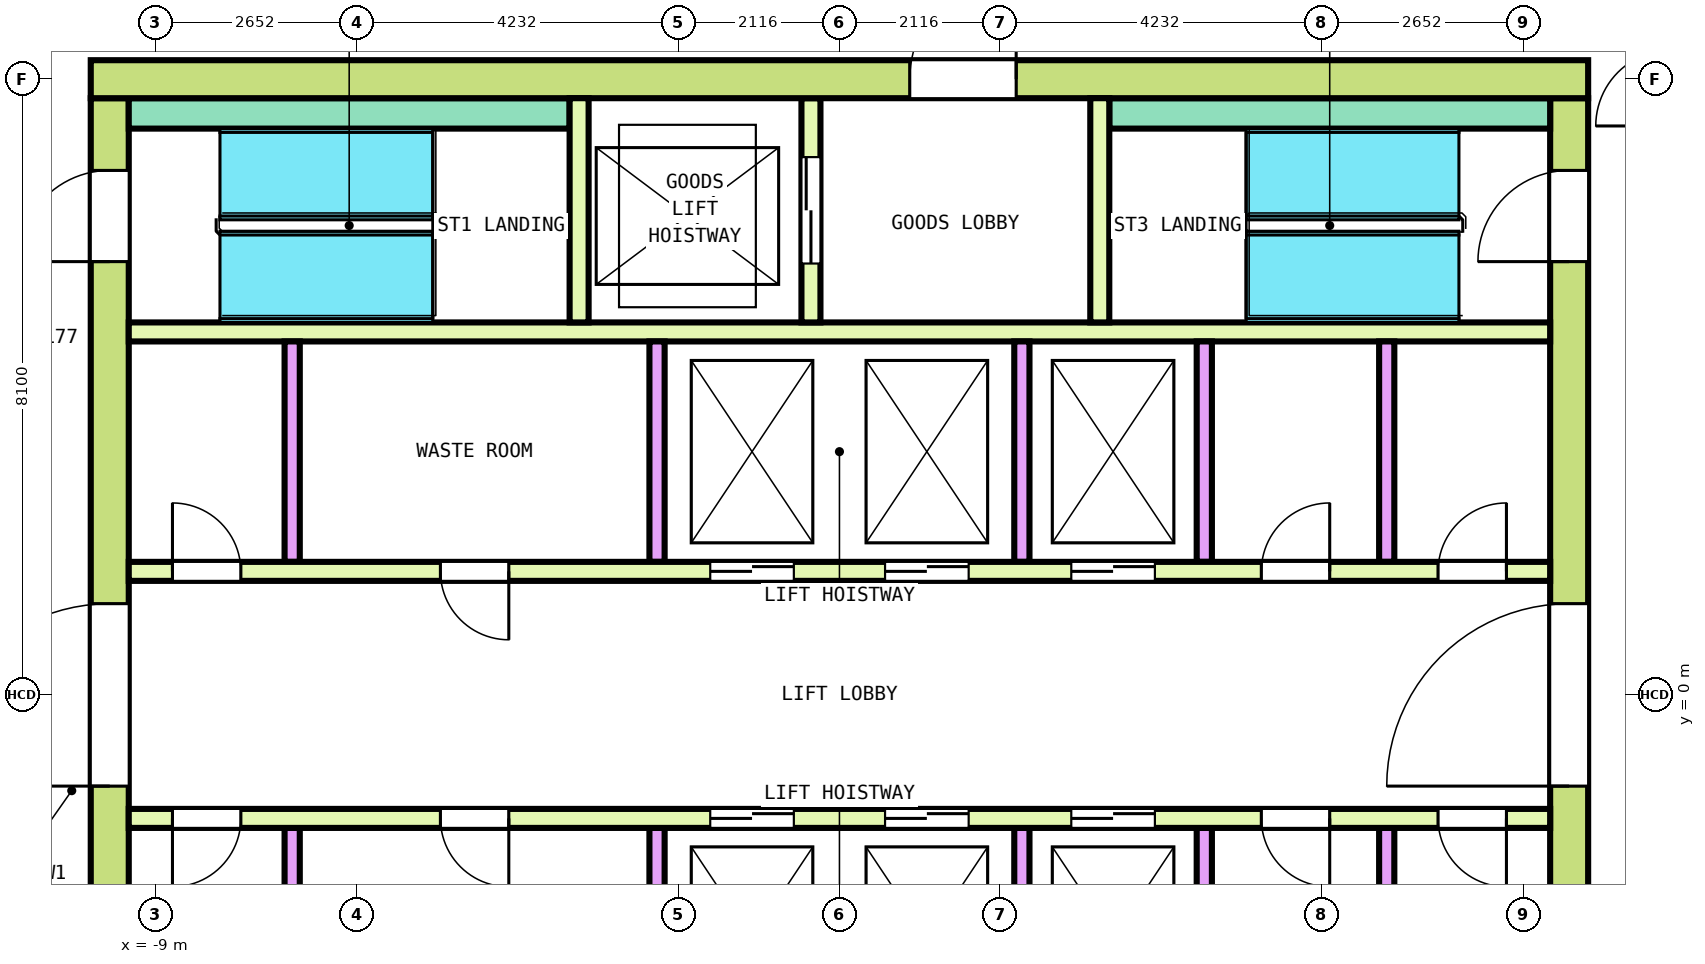
"""IFC4 building model, lengths in metres.
Left out: names, types, materials, properties, quantities, classifications, styles, units other than length and angle.
Written with IfcOpenShell. Run it as: python <this file> out.ifc"""

import sys

from ifc_helpers import new_model, si_unit, direction, frame, frame_2d, origin, place, context, subcontext, project, spatial, rectangle, extrude, element, fill, save


model = new_model("IFC4")
c1 = context("Model", 3, precision=1e-05, world=origin(), true_north=direction((0.0, 1.0)))
c2 = subcontext(c1, "Body", "Model", "MODEL_VIEW")
j1 = project(units=[si_unit("LENGTHUNIT", "METRE"), si_unit("PLANEANGLEUNIT", "RADIAN")], contexts=[c1])
p1 = place(None, origin())
s1 = spatial("IfcSite", under=j1, at=p1, CompositionType="ELEMENT")
p2 = place(p1, origin())
s2 = spatial("IfcBuilding", under=s1, at=p2, CompositionType="ELEMENT")
p3 = place(p2, frame((0.0, 0.0, 279.0)))
s3 = spatial("IfcBuildingStorey", under=s2, at=p3, CompositionType="ELEMENT", Elevation=279.0)
p4 = place(p3, frame((-9.85, 8.1, 0.0), z_axis=(0.0, 0.0, 1.0), x_axis=(1.0, 0.0, 0.0)))
e1 = element("IfcWall", 1, at=p4, inside=s3, PredefinedType="SHEAR", context=c2, shape_type="SweptSolid", body=[
    extrude(rectangle(XDim=19.7, YDim=0.5, at=frame_2d((9.85, 0.0))), origin(), (0.0, 0.0, 1.0), 3.7),
])
p5 = place(p4, frame((10.775, 0.0, 0.0)))
e2 = element("IfcOpeningElement", 2, at=p5, cuts=e1, PredefinedType="OPENING", context=c2, shape_type="SweptSolid", body=[
    extrude(rectangle(XDim=1.4, YDim=2.1, at=frame_2d((0.7, 1.05))), frame((0.0, 0.26, 0.0), z_axis=(0.0, -1.0, 0.0), x_axis=(1.0, 0.0, 0.0)), (0.0, 0.0, 1.0), 0.52),
])
p6 = place(p3, frame((-9.6, -7.85, 0.0), z_axis=(0.0, 0.0, 1.0), x_axis=(0.0, 1.0, 0.0)))
e3 = element("IfcWall", 3, at=p6, inside=s3, PredefinedType="SHEAR", context=c2, shape_type="SweptSolid", body=[
    extrude(rectangle(XDim=15.7, YDim=0.5, at=frame_2d((7.85, 0.0))), origin(), (0.0, 0.0, 1.0), 3.7),
])
p7 = place(p6, frame((6.65, 0.0, 0.0)))
e4 = element("IfcOpeningElement", 4, at=p7, cuts=e3, PredefinedType="OPENING", context=c2, shape_type="SweptSolid", body=[
    extrude(rectangle(XDim=2.4, YDim=2.1, at=frame_2d((1.2, 1.05))), frame((0.0, 0.26, 0.0), z_axis=(0.0, -1.0, 0.0), x_axis=(1.0, 0.0, 0.0)), (0.0, 0.0, 1.0), 0.52),
])
p8 = place(p6, frame((13.55, 0.0, 0.0)))
e5 = element("IfcOpeningElement", 5, at=p8, cuts=e3, PredefinedType="OPENING", context=c2, shape_type="SweptSolid", body=[
    extrude(rectangle(XDim=1.2, YDim=2.1, at=frame_2d((0.6, 1.05))), frame((0.0, 0.26, 0.0), z_axis=(0.0, -1.0, 0.0), x_axis=(1.0, 0.0, 0.0)), (0.0, 0.0, 1.0), 0.52),
])
p9 = place(p6, frame((0.95, 0.0, 0.0)))
e6 = element("IfcOpeningElement", 6, at=p9, cuts=e3, PredefinedType="OPENING", context=c2, shape_type="SweptSolid", body=[
    extrude(rectangle(XDim=1.2, YDim=2.1, at=frame_2d((0.6, 1.05))), frame((0.0, 0.26, 0.0), z_axis=(0.0, -1.0, 0.0), x_axis=(1.0, 0.0, 0.0)), (0.0, 0.0, 1.0), 0.52),
])
p10 = place(p3, frame((9.6, -7.85, 0.0), z_axis=(0.0, 0.0, 1.0), x_axis=(0.0, 1.0, 0.0)))
e7 = element("IfcWall", 7, at=p10, inside=s3, PredefinedType="SHEAR", context=c2, shape_type="SweptSolid", body=[
    extrude(rectangle(XDim=15.7, YDim=0.5, at=frame_2d((7.85, 0.0))), origin(), (0.0, 0.0, 1.0), 3.7),
])
p11 = place(p10, frame((6.65, 0.0, 0.0)))
e8 = element("IfcOpeningElement", 8, at=p11, cuts=e7, PredefinedType="OPENING", context=c2, shape_type="SweptSolid", body=[
    extrude(rectangle(XDim=2.4, YDim=2.1, at=frame_2d((1.2, 1.05))), frame((0.0, 0.26, 0.0), z_axis=(0.0, -1.0, 0.0), x_axis=(1.0, 0.0, 0.0)), (0.0, 0.0, 1.0), 0.52),
])
p12 = place(p10, frame((13.55, 0.0, 0.0)))
e9 = element("IfcOpeningElement", 9, at=p12, cuts=e7, PredefinedType="OPENING", context=c2, shape_type="SweptSolid", body=[
    extrude(rectangle(XDim=1.2, YDim=2.1, at=frame_2d((0.6, 1.05))), frame((0.0, 0.26, 0.0), z_axis=(0.0, -1.0, 0.0), x_axis=(1.0, 0.0, 0.0)), (0.0, 0.0, 1.0), 0.52),
])
p13 = place(p10, frame((1.05, 0.0, 0.0)))
e10 = element("IfcOpeningElement", 10, at=p13, cuts=e7, PredefinedType="OPENING", context=c2, shape_type="SweptSolid", body=[
    extrude(rectangle(XDim=1.0, YDim=2.1, at=frame_2d((0.5, 1.05))), frame((0.0, 0.26, 0.0), z_axis=(0.0, -1.0, 0.0), x_axis=(1.0, 0.0, 0.0)), (0.0, 0.0, 1.0), 0.52),
])
p14 = place(p3, frame((-9.35, 1.625, 0.0), z_axis=(0.0, 0.0, 1.0), x_axis=(1.0, 0.0, 0.0)))
e11 = element("IfcWall", 11, at=p14, inside=s3, PredefinedType="SOLIDWALL", context=c2, shape_type="SweptSolid", body=[
    extrude(rectangle(XDim=18.7, YDim=0.25, at=frame_2d((9.35, 0.0))), origin(), (0.0, 0.0, 1.0), 3.7),
])
p15 = place(p14, frame((7.65, 0.0, 0.0)))
e12 = element("IfcOpeningElement", 12, at=p15, cuts=e11, PredefinedType="OPENING", context=c2, shape_type="SweptSolid", body=[
    extrude(rectangle(XDim=1.1, YDim=2.1, at=frame_2d((0.55, 1.05))), frame((0.0, 0.135, 0.0), z_axis=(0.0, -1.0, 0.0), x_axis=(1.0, 0.0, 0.0)), (0.0, 0.0, 1.0), 0.27),
])
p16 = place(p14, frame((9.95, 0.0, 0.0)))
e13 = element("IfcOpeningElement", 13, at=p16, cuts=e11, PredefinedType="OPENING", context=c2, shape_type="SweptSolid", body=[
    extrude(rectangle(XDim=1.1, YDim=2.1, at=frame_2d((0.55, 1.05))), frame((0.0, 0.135, 0.0), z_axis=(0.0, -1.0, 0.0), x_axis=(1.0, 0.0, 0.0)), (0.0, 0.0, 1.0), 0.27),
])
p17 = place(p14, frame((12.4, 0.0, 0.0)))
e14 = element("IfcOpeningElement", 14, at=p17, cuts=e11, PredefinedType="OPENING", context=c2, shape_type="SweptSolid", body=[
    extrude(rectangle(XDim=1.1, YDim=2.1, at=frame_2d((0.55, 1.05))), frame((0.0, 0.135, 0.0), z_axis=(0.0, -1.0, 0.0), x_axis=(1.0, 0.0, 0.0)), (0.0, 0.0, 1.0), 0.27),
])
p18 = place(p14, frame((0.575, 0.0, 0.0)))
e15 = element("IfcOpeningElement", 15, at=p18, cuts=e11, PredefinedType="OPENING", context=c2, shape_type="SweptSolid", body=[
    extrude(rectangle(XDim=0.9, YDim=2.1, at=frame_2d((0.45, 1.05))), frame((0.0, 0.135, 0.0), z_axis=(0.0, -1.0, 0.0), x_axis=(1.0, 0.0, 0.0)), (0.0, 0.0, 1.0), 0.27),
])
p19 = place(p14, frame((4.1, 0.0, 0.0)))
e16 = element("IfcOpeningElement", 16, at=p19, cuts=e11, PredefinedType="OPENING", context=c2, shape_type="SweptSolid", body=[
    extrude(rectangle(XDim=0.9, YDim=2.1, at=frame_2d((0.45, 1.05))), frame((0.0, 0.135, 0.0), z_axis=(0.0, -1.0, 0.0), x_axis=(1.0, 0.0, 0.0)), (0.0, 0.0, 1.0), 0.27),
])
p20 = place(p14, frame((14.9, 0.0, 0.0)))
e17 = element("IfcOpeningElement", 17, at=p20, cuts=e11, PredefinedType="OPENING", context=c2, shape_type="SweptSolid", body=[
    extrude(rectangle(XDim=0.9, YDim=2.1, at=frame_2d((0.45, 1.05))), frame((0.0, 0.135, 0.0), z_axis=(0.0, -1.0, 0.0), x_axis=(1.0, 0.0, 0.0)), (0.0, 0.0, 1.0), 0.27),
])
p21 = place(p14, frame((17.225, 0.0, 0.0)))
e18 = element("IfcOpeningElement", 18, at=p21, cuts=e11, PredefinedType="OPENING", context=c2, shape_type="SweptSolid", body=[
    extrude(rectangle(XDim=0.9, YDim=2.1, at=frame_2d((0.45, 1.05))), frame((0.0, 0.135, 0.0), z_axis=(0.0, -1.0, 0.0), x_axis=(1.0, 0.0, 0.0)), (0.0, 0.0, 1.0), 0.27),
])
p22 = place(p3, frame((-9.35, 4.775, 0.0), z_axis=(0.0, 0.0, 1.0), x_axis=(1.0, 0.0, 0.0)))
e19 = element("IfcWall", 19, at=p22, inside=s3, PredefinedType="SOLIDWALL", context=c2, shape_type="SweptSolid", body=[
    extrude(rectangle(XDim=18.7, YDim=0.25, at=frame_2d((9.35, 0.0))), origin(), (0.0, 0.0, 1.0), 3.7),
])
for number, where, z_axis, x_axis in (
    (20, (-7.2, 1.75, 0.0), (0.0, 0.0, 1.0), (0.0, 1.0, 0.0)),
    (21, (-2.4, 1.75, 0.0), (0.0, 0.0, 1.0), (0.0, 1.0, 0.0)),
    (22, (2.4, 1.75, 0.0), (0.0, 0.0, 1.0), (0.0, 1.0, 0.0)),
    (23, (4.8, 1.75, 0.0), (0.0, 0.0, 1.0), (0.0, 1.0, 0.0)),
    (24, (7.2, 1.75, 0.0), (0.0, 0.0, 1.0), (0.0, 1.0, 0.0)),
):
    element("IfcWall", number, at=place(p3, frame(where, z_axis=z_axis, x_axis=x_axis)), inside=s3, PredefinedType="SOLIDWALL", context=c2, shape_type="SweptSolid", body=[
        extrude(rectangle(XDim=2.9, YDim=0.2, at=frame_2d((1.45, 0.0))), origin(), (0.0, 0.0, 1.0), 3.7),
    ])
p23 = place(p3, frame((-9.35, -1.625, 0.0), z_axis=(0.0, 0.0, 1.0), x_axis=(1.0, 0.0, 0.0)))
e25 = element("IfcWall", 25, at=p23, inside=s3, PredefinedType="SOLIDWALL", context=c2, shape_type="SweptSolid", body=[
    extrude(rectangle(XDim=18.7, YDim=0.25, at=frame_2d((9.35, 0.0))), origin(), (0.0, 0.0, 1.0), 3.7),
])
p24 = place(p23, frame((7.65, 0.0, 0.0)))
e26 = element("IfcOpeningElement", 26, at=p24, cuts=e25, PredefinedType="OPENING", context=c2, shape_type="SweptSolid", body=[
    extrude(rectangle(XDim=1.1, YDim=2.1, at=frame_2d((0.55, 1.05))), frame((0.0, 0.135, 0.0), z_axis=(0.0, -1.0, 0.0), x_axis=(1.0, 0.0, 0.0)), (0.0, 0.0, 1.0), 0.27),
])
p25 = place(p23, frame((9.95, 0.0, 0.0)))
e27 = element("IfcOpeningElement", 27, at=p25, cuts=e25, PredefinedType="OPENING", context=c2, shape_type="SweptSolid", body=[
    extrude(rectangle(XDim=1.1, YDim=2.1, at=frame_2d((0.55, 1.05))), frame((0.0, 0.135, 0.0), z_axis=(0.0, -1.0, 0.0), x_axis=(1.0, 0.0, 0.0)), (0.0, 0.0, 1.0), 0.27),
])
p26 = place(p23, frame((12.4, 0.0, 0.0)))
e28 = element("IfcOpeningElement", 28, at=p26, cuts=e25, PredefinedType="OPENING", context=c2, shape_type="SweptSolid", body=[
    extrude(rectangle(XDim=1.1, YDim=2.1, at=frame_2d((0.55, 1.05))), frame((0.0, 0.135, 0.0), z_axis=(0.0, -1.0, 0.0), x_axis=(1.0, 0.0, 0.0)), (0.0, 0.0, 1.0), 0.27),
])
p27 = place(p23, frame((0.575, 0.0, 0.0)))
e29 = element("IfcOpeningElement", 29, at=p27, cuts=e25, PredefinedType="OPENING", context=c2, shape_type="SweptSolid", body=[
    extrude(rectangle(XDim=0.9, YDim=2.1, at=frame_2d((0.45, 1.05))), frame((0.0, 0.135, 0.0), z_axis=(0.0, -1.0, 0.0), x_axis=(1.0, 0.0, 0.0)), (0.0, 0.0, 1.0), 0.27),
])
p28 = place(p23, frame((4.1, 0.0, 0.0)))
e30 = element("IfcOpeningElement", 30, at=p28, cuts=e25, PredefinedType="OPENING", context=c2, shape_type="SweptSolid", body=[
    extrude(rectangle(XDim=0.9, YDim=2.1, at=frame_2d((0.45, 1.05))), frame((0.0, 0.135, 0.0), z_axis=(0.0, -1.0, 0.0), x_axis=(1.0, 0.0, 0.0)), (0.0, 0.0, 1.0), 0.27),
])
p29 = place(p23, frame((14.9, 0.0, 0.0)))
e31 = element("IfcOpeningElement", 31, at=p29, cuts=e25, PredefinedType="OPENING", context=c2, shape_type="SweptSolid", body=[
    extrude(rectangle(XDim=0.9, YDim=2.1, at=frame_2d((0.45, 1.05))), frame((0.0, 0.135, 0.0), z_axis=(0.0, -1.0, 0.0), x_axis=(1.0, 0.0, 0.0)), (0.0, 0.0, 1.0), 0.27),
])
p30 = place(p23, frame((17.225, 0.0, 0.0)))
e32 = element("IfcOpeningElement", 32, at=p30, cuts=e25, PredefinedType="OPENING", context=c2, shape_type="SweptSolid", body=[
    extrude(rectangle(XDim=0.9, YDim=2.1, at=frame_2d((0.45, 1.05))), frame((0.0, 0.135, 0.0), z_axis=(0.0, -1.0, 0.0), x_axis=(1.0, 0.0, 0.0)), (0.0, 0.0, 1.0), 0.27),
])
for number, where, z_axis, x_axis in (
    (33, (-7.2, -4.65, 0.0), (0.0, 0.0, 1.0), (0.0, 1.0, 0.0)),
    (34, (-2.4, -4.65, 0.0), (0.0, 0.0, 1.0), (0.0, 1.0, 0.0)),
    (35, (2.4, -4.65, 0.0), (0.0, 0.0, 1.0), (0.0, 1.0, 0.0)),
    (36, (4.8, -4.65, 0.0), (0.0, 0.0, 1.0), (0.0, 1.0, 0.0)),
    (37, (7.2, -4.65, 0.0), (0.0, 0.0, 1.0), (0.0, 1.0, 0.0)),
):
    element("IfcWall", number, at=place(p3, frame(where, z_axis=z_axis, x_axis=x_axis)), inside=s3, PredefinedType="SOLIDWALL", context=c2, shape_type="SweptSolid", body=[
        extrude(rectangle(XDim=2.9, YDim=0.2, at=frame_2d((1.45, 0.0))), origin(), (0.0, 0.0, 1.0), 3.7),
    ])
for number, where, z_axis, x_axis in (
    (38, (-9.35, 7.65, 0.0), (0.0, 0.0, 1.0), (1.0, 0.0, 0.0)),
    (39, (3.55, 7.65, 0.0), (0.0, 0.0, 1.0), (1.0, 0.0, 0.0)),
):
    element("IfcWall", number, at=place(p3, frame(where, z_axis=z_axis, x_axis=x_axis)), inside=s3, PredefinedType="SOLIDWALL", context=c2, shape_type="SweptSolid", body=[
        extrude(rectangle(XDim=5.8, YDim=0.4, at=frame_2d((2.9, 0.0))), origin(), (0.0, 0.0, 1.0), 3.7),
    ])
p31 = place(p3, frame((-3.425, 4.9, 0.0), z_axis=(0.0, 0.0, 1.0), x_axis=(0.0, 1.0, 0.0)))
e40 = element("IfcWall", 40, at=p31, inside=s3, PredefinedType="SOLIDWALL", context=c2, shape_type="SweptSolid", body=[
    extrude(rectangle(XDim=2.95, YDim=0.25, at=frame_2d((1.475, 0.0))), origin(), (0.0, 0.0, 1.0), 3.7),
])
p32 = place(p3, frame((-0.375, 4.9, 0.0), z_axis=(0.0, 0.0, 1.0), x_axis=(0.0, 1.0, 0.0)))
e41 = element("IfcWall", 41, at=p32, inside=s3, PredefinedType="SOLIDWALL", context=c2, shape_type="SweptSolid", body=[
    extrude(rectangle(XDim=2.95, YDim=0.25, at=frame_2d((1.475, 0.0))), origin(), (0.0, 0.0, 1.0), 3.7),
])
p33 = place(p32, frame((0.775, 0.0, 0.0)))
e42 = element("IfcOpeningElement", 42, at=p33, cuts=e41, PredefinedType="OPENING", context=c2, shape_type="SweptSolid", body=[
    extrude(rectangle(XDim=1.4, YDim=2.1, at=frame_2d((0.7, 1.05))), frame((0.0, 0.135, 0.0), z_axis=(0.0, -1.0, 0.0), x_axis=(1.0, 0.0, 0.0)), (0.0, 0.0, 1.0), 0.27),
])
p34 = place(p3, frame((3.425, 4.9, 0.0), z_axis=(0.0, 0.0, 1.0), x_axis=(0.0, 1.0, 0.0)))
e43 = element("IfcWall", 43, at=p34, inside=s3, PredefinedType="SOLIDWALL", context=c2, shape_type="SweptSolid", body=[
    extrude(rectangle(XDim=2.95, YDim=0.25, at=frame_2d((1.475, 0.0))), origin(), (0.0, 0.0, 1.0), 3.7),
])
p35 = place(p15, origin())
e44 = element("IfcDoor", 44, at=p35, inside=s3, OperationType="DOUBLE_DOOR_SLIDING", PredefinedType="DOOR", context=c2, shape_type="SweptSolid", body=[
    extrude(rectangle(XDim=1.1, YDim=2.1, at=frame_2d((0.55, 1.05))), frame((0.0, 0.075, 0.0), z_axis=(0.0, -1.0, 0.0), x_axis=(1.0, 0.0, 0.0)), (0.0, 0.0, 1.0), 0.15),
])
fill(e12, e44)
p36 = place(p16, origin())
e45 = element("IfcDoor", 45, at=p36, inside=s3, OperationType="DOUBLE_DOOR_SLIDING", PredefinedType="DOOR", context=c2, shape_type="SweptSolid", body=[
    extrude(rectangle(XDim=1.1, YDim=2.1, at=frame_2d((0.55, 1.05))), frame((0.0, 0.075, 0.0), z_axis=(0.0, -1.0, 0.0), x_axis=(1.0, 0.0, 0.0)), (0.0, 0.0, 1.0), 0.15),
])
fill(e13, e45)
p37 = place(p17, origin())
e46 = element("IfcDoor", 46, at=p37, inside=s3, OperationType="DOUBLE_DOOR_SLIDING", PredefinedType="DOOR", context=c2, shape_type="SweptSolid", body=[
    extrude(rectangle(XDim=1.1, YDim=2.1, at=frame_2d((0.55, 1.05))), frame((0.0, 0.075, 0.0), z_axis=(0.0, -1.0, 0.0), x_axis=(1.0, 0.0, 0.0)), (0.0, 0.0, 1.0), 0.15),
])
fill(e14, e46)
p38 = place(p24, origin())
e47 = element("IfcDoor", 47, at=p38, inside=s3, OperationType="DOUBLE_DOOR_SLIDING", PredefinedType="DOOR", context=c2, shape_type="SweptSolid", body=[
    extrude(rectangle(XDim=1.1, YDim=2.1, at=frame_2d((0.55, 1.05))), frame((0.0, 0.075, 0.0), z_axis=(0.0, -1.0, 0.0), x_axis=(1.0, 0.0, 0.0)), (0.0, 0.0, 1.0), 0.15),
])
fill(e26, e47)
p39 = place(p25, origin())
e48 = element("IfcDoor", 48, at=p39, inside=s3, OperationType="DOUBLE_DOOR_SLIDING", PredefinedType="DOOR", context=c2, shape_type="SweptSolid", body=[
    extrude(rectangle(XDim=1.1, YDim=2.1, at=frame_2d((0.55, 1.05))), frame((0.0, 0.075, 0.0), z_axis=(0.0, -1.0, 0.0), x_axis=(1.0, 0.0, 0.0)), (0.0, 0.0, 1.0), 0.15),
])
fill(e27, e48)
p40 = place(p26, origin())
e49 = element("IfcDoor", 49, at=p40, inside=s3, OperationType="DOUBLE_DOOR_SLIDING", PredefinedType="DOOR", context=c2, shape_type="SweptSolid", body=[
    extrude(rectangle(XDim=1.1, YDim=2.1, at=frame_2d((0.55, 1.05))), frame((0.0, 0.075, 0.0), z_axis=(0.0, -1.0, 0.0), x_axis=(1.0, 0.0, 0.0)), (0.0, 0.0, 1.0), 0.15),
])
fill(e28, e49)
p41 = place(p33, origin())
e50 = element("IfcDoor", 50, at=p41, inside=s3, OperationType="DOUBLE_DOOR_SLIDING", PredefinedType="DOOR", context=c2, shape_type="SweptSolid", body=[
    extrude(rectangle(XDim=1.4, YDim=2.1, at=frame_2d((0.7, 1.05))), frame((0.0, 0.075, 0.0), z_axis=(0.0, -1.0, 0.0), x_axis=(1.0, 0.0, 0.0)), (0.0, 0.0, 1.0), 0.15),
])
fill(e42, e50)
p42 = place(p7, origin())
e51 = element("IfcDoor", 51, at=p42, inside=s3, OperationType="DOUBLE_DOOR_SINGLE_SWING", PredefinedType="DOOR", context=c2, shape_type="SweptSolid", body=[
    extrude(rectangle(XDim=2.4, YDim=2.1, at=frame_2d((1.2, 1.05))), frame((0.0, 0.2, 0.0), z_axis=(0.0, -1.0, 0.0), x_axis=(1.0, 0.0, 0.0)), (0.0, 0.0, 1.0), 0.4),
])
fill(e4, e51)
p43 = place(p11, origin())
e52 = element("IfcDoor", 52, at=p43, inside=s3, OperationType="DOUBLE_DOOR_SINGLE_SWING", PredefinedType="DOOR", context=c2, shape_type="SweptSolid", body=[
    extrude(rectangle(XDim=2.4, YDim=2.1, at=frame_2d((1.2, 1.05))), frame((0.0, 0.2, 0.0), z_axis=(0.0, -1.0, 0.0), x_axis=(1.0, 0.0, 0.0)), (0.0, 0.0, 1.0), 0.4),
])
fill(e8, e52)
p44 = place(p8, origin())
e53 = element("IfcDoor", 53, at=p44, inside=s3, OperationType="SINGLE_SWING_RIGHT", PredefinedType="DOOR", context=c2, shape_type="SweptSolid", body=[
    extrude(rectangle(XDim=1.2, YDim=2.1, at=frame_2d((0.6, 1.05))), frame((0.0, 0.2, 0.0), z_axis=(0.0, -1.0, 0.0), x_axis=(1.0, 0.0, 0.0)), (0.0, 0.0, 1.0), 0.4),
])
fill(e5, e53)
p45 = place(p12, origin())
e54 = element("IfcDoor", 54, at=p45, inside=s3, OperationType="SINGLE_SWING_RIGHT", PredefinedType="DOOR", context=c2, shape_type="SweptSolid", body=[
    extrude(rectangle(XDim=1.2, YDim=2.1, at=frame_2d((0.6, 1.05))), frame((0.0, 0.2, 0.0), z_axis=(0.0, -1.0, 0.0), x_axis=(1.0, 0.0, 0.0)), (0.0, 0.0, 1.0), 0.4),
])
fill(e9, e54)
p46 = place(p5, origin())
e55 = element("IfcDoor", 55, at=p46, inside=s3, OperationType="DOUBLE_DOOR_SINGLE_SWING", PredefinedType="DOOR", context=c2, shape_type="SweptSolid", body=[
    extrude(rectangle(XDim=1.4, YDim=2.1, at=frame_2d((0.7, 1.05))), frame((0.0, 0.2, 0.0), z_axis=(0.0, -1.0, 0.0), x_axis=(1.0, 0.0, 0.0)), (0.0, 0.0, 1.0), 0.4),
])
fill(e2, e55)
p47 = place(p18, origin())
e56 = element("IfcDoor", 56, at=p47, inside=s3, OperationType="SINGLE_SWING_RIGHT", PredefinedType="DOOR", context=c2, shape_type="SweptSolid", body=[
    extrude(rectangle(XDim=0.9, YDim=2.1, at=frame_2d((0.45, 1.05))), frame((0.0, 0.075, 0.0), z_axis=(0.0, -1.0, 0.0), x_axis=(1.0, 0.0, 0.0)), (0.0, 0.0, 1.0), 0.15),
])
fill(e15, e56)
p48 = place(p19, origin())
e57 = element("IfcDoor", 57, at=p48, inside=s3, OperationType="SINGLE_SWING_LEFT", PredefinedType="DOOR", context=c2, shape_type="SweptSolid", body=[
    extrude(rectangle(XDim=0.9, YDim=2.1, at=frame_2d((0.45, 1.05))), frame((0.0, 0.075, 0.0), z_axis=(0.0, -1.0, 0.0), x_axis=(1.0, 0.0, 0.0)), (0.0, 0.0, 1.0), 0.15),
])
fill(e16, e57)
p49 = place(p20, origin())
e58 = element("IfcDoor", 58, at=p49, inside=s3, OperationType="SINGLE_SWING_RIGHT", PredefinedType="DOOR", context=c2, shape_type="SweptSolid", body=[
    extrude(rectangle(XDim=0.9, YDim=2.1, at=frame_2d((0.45, 1.05))), frame((0.0, 0.075, 0.0), z_axis=(0.0, -1.0, 0.0), x_axis=(1.0, 0.0, 0.0)), (0.0, 0.0, 1.0), 0.15),
])
fill(e17, e58)
p50 = place(p21, origin())
e59 = element("IfcDoor", 59, at=p50, inside=s3, OperationType="SINGLE_SWING_LEFT", PredefinedType="DOOR", context=c2, shape_type="SweptSolid", body=[
    extrude(rectangle(XDim=0.9, YDim=2.1, at=frame_2d((0.45, 1.05))), frame((0.0, 0.075, 0.0), z_axis=(0.0, -1.0, 0.0), x_axis=(1.0, 0.0, 0.0)), (0.0, 0.0, 1.0), 0.15),
])
fill(e18, e59)
p51 = place(p27, origin())
e60 = element("IfcDoor", 60, at=p51, inside=s3, OperationType="SINGLE_SWING_RIGHT", PredefinedType="DOOR", context=c2, shape_type="SweptSolid", body=[
    extrude(rectangle(XDim=0.9, YDim=2.1, at=frame_2d((0.45, 1.05))), frame((0.0, 0.075, 0.0), z_axis=(0.0, -1.0, 0.0), x_axis=(1.0, 0.0, 0.0)), (0.0, 0.0, 1.0), 0.15),
])
fill(e29, e60)
p52 = place(p28, origin())
e61 = element("IfcDoor", 61, at=p52, inside=s3, OperationType="SINGLE_SWING_LEFT", PredefinedType="DOOR", context=c2, shape_type="SweptSolid", body=[
    extrude(rectangle(XDim=0.9, YDim=2.1, at=frame_2d((0.45, 1.05))), frame((0.0, 0.075, 0.0), z_axis=(0.0, -1.0, 0.0), x_axis=(1.0, 0.0, 0.0)), (0.0, 0.0, 1.0), 0.15),
])
fill(e30, e61)
p53 = place(p29, origin())
e62 = element("IfcDoor", 62, at=p53, inside=s3, OperationType="SINGLE_SWING_RIGHT", PredefinedType="DOOR", context=c2, shape_type="SweptSolid", body=[
    extrude(rectangle(XDim=0.9, YDim=2.1, at=frame_2d((0.45, 1.05))), frame((0.0, 0.075, 0.0), z_axis=(0.0, -1.0, 0.0), x_axis=(1.0, 0.0, 0.0)), (0.0, 0.0, 1.0), 0.15),
])
fill(e31, e62)
p54 = place(p30, origin())
e63 = element("IfcDoor", 63, at=p54, inside=s3, OperationType="SINGLE_SWING_LEFT", PredefinedType="DOOR", context=c2, shape_type="SweptSolid", body=[
    extrude(rectangle(XDim=0.9, YDim=2.1, at=frame_2d((0.45, 1.05))), frame((0.0, 0.075, 0.0), z_axis=(0.0, -1.0, 0.0), x_axis=(1.0, 0.0, 0.0)), (0.0, 0.0, 1.0), 0.15),
])
fill(e32, e63)
save(model, sys.argv[1])
